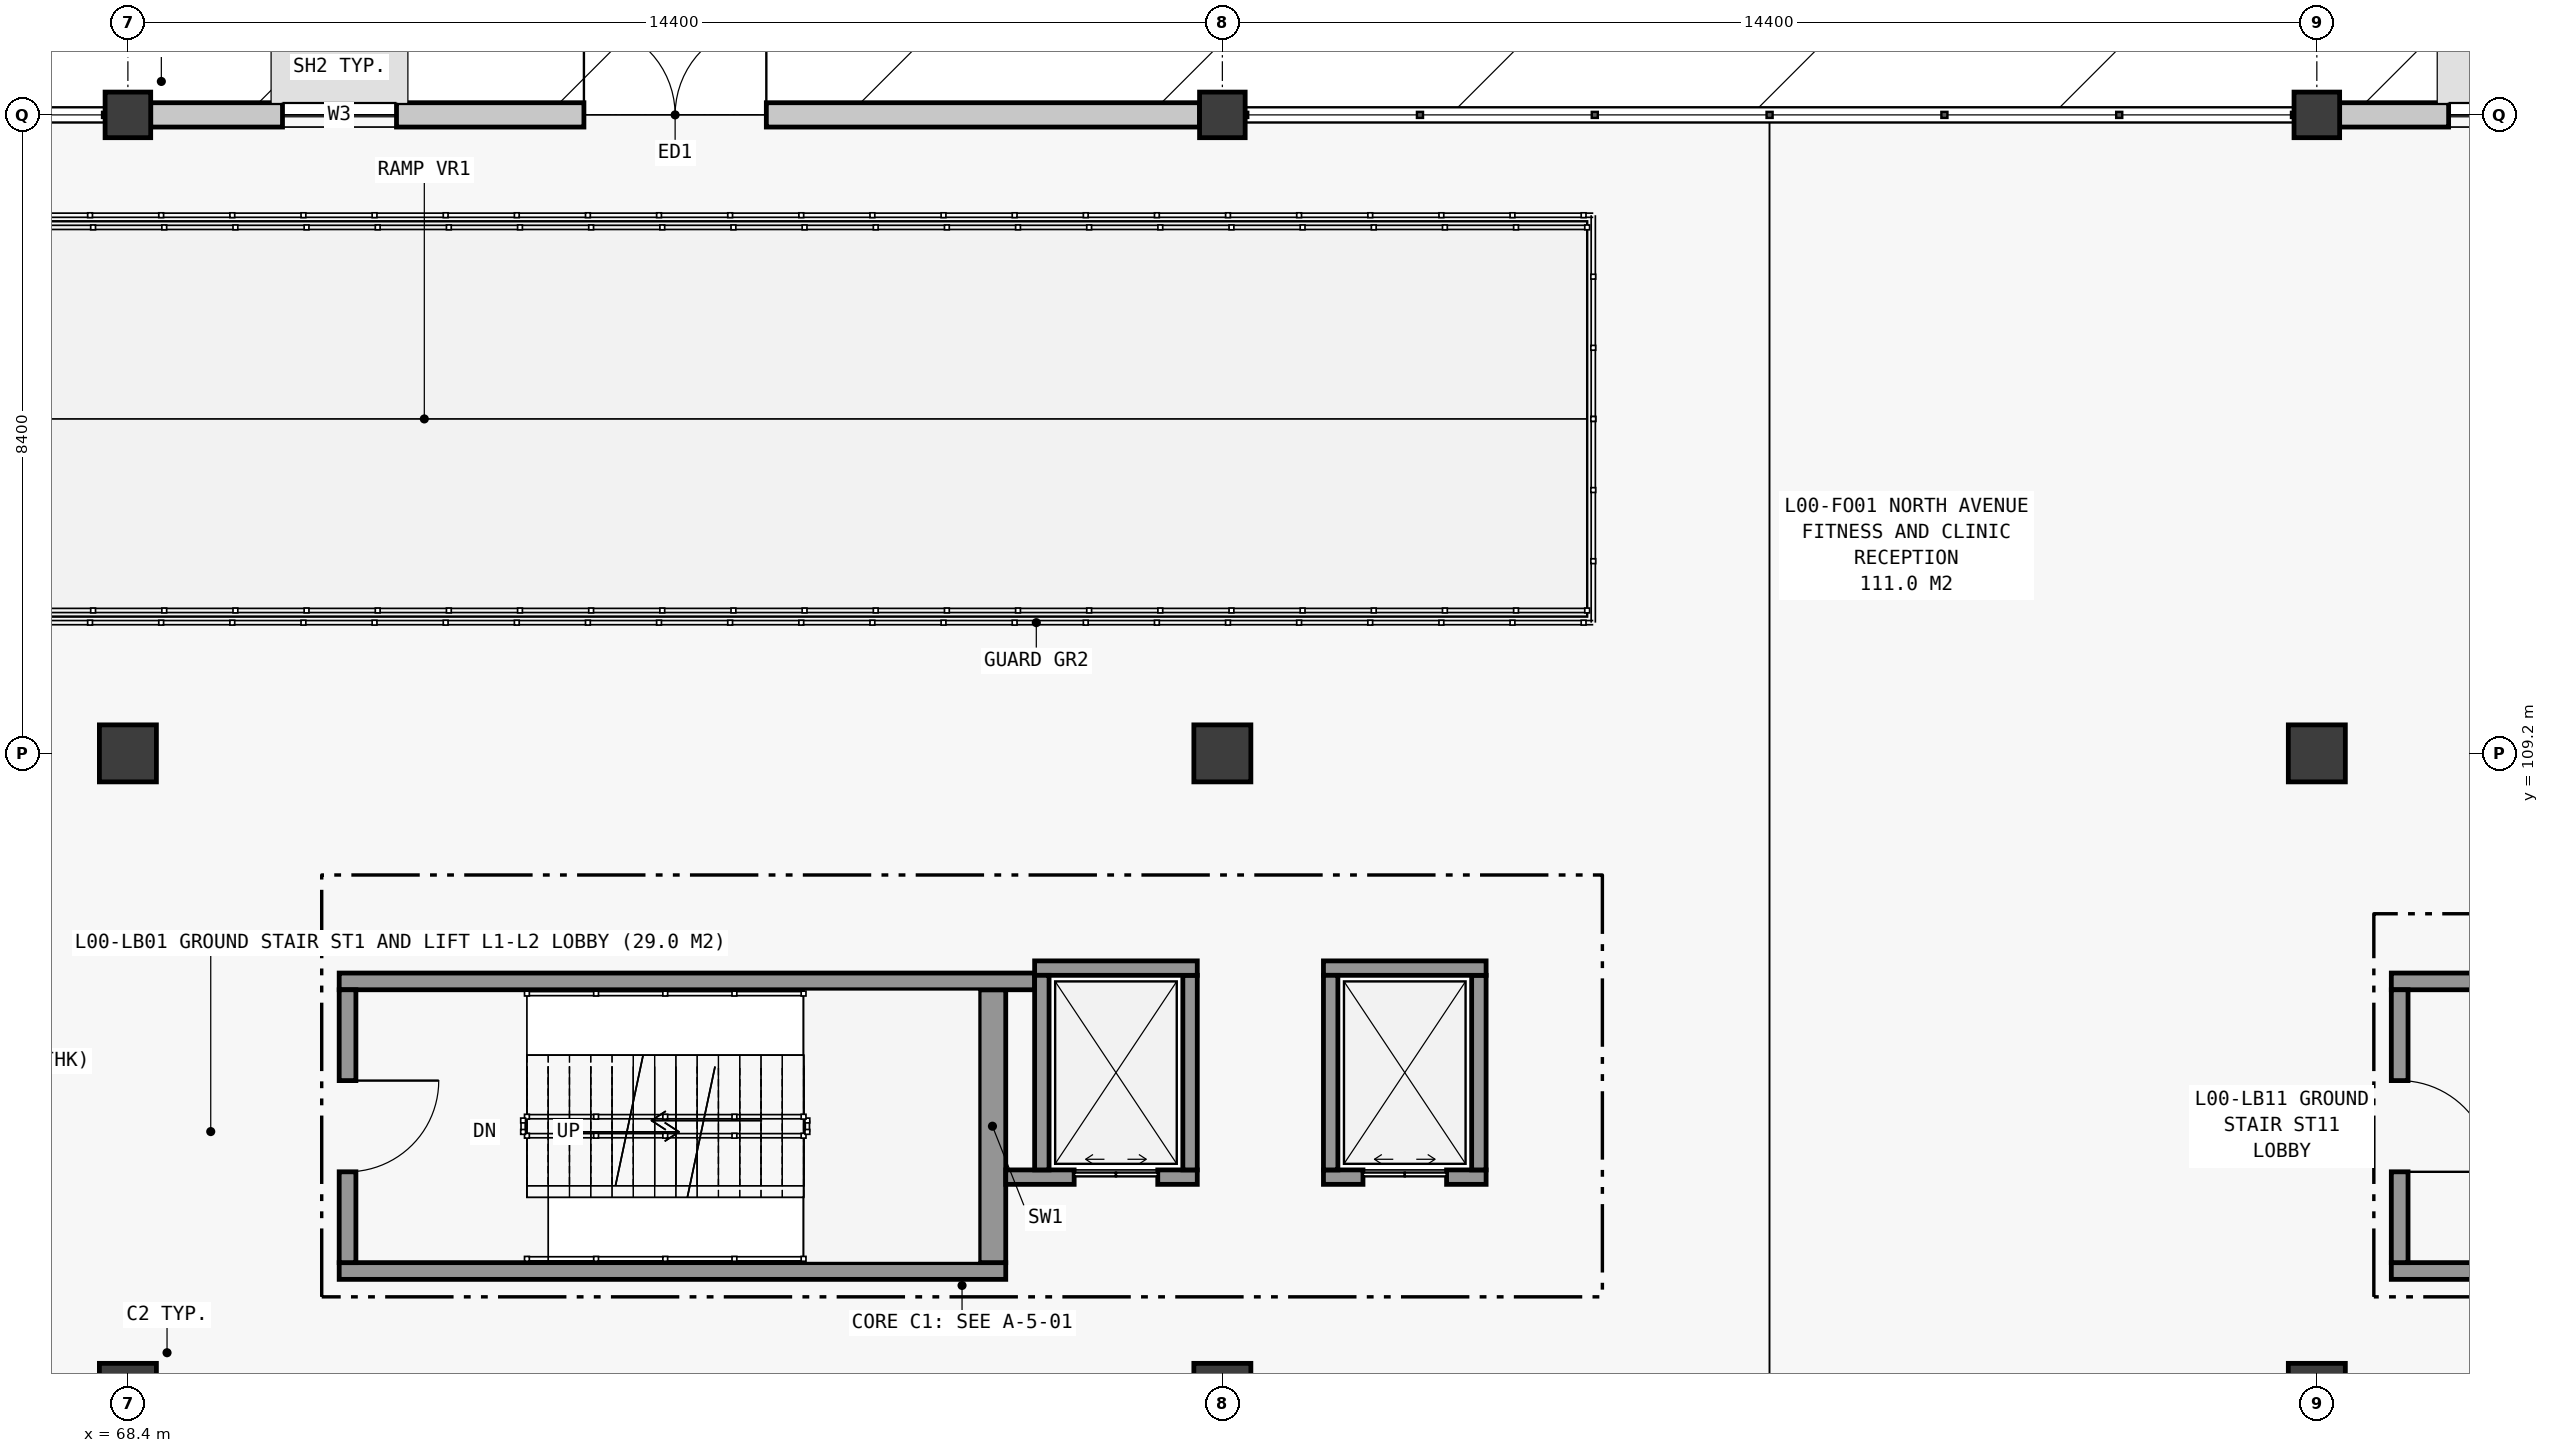
"""IFC4 building model, lengths in metres.
Left out: names, types, materials, properties, quantities, classifications, styles, units other than length and angle.
Written with IfcOpenShell. Run it as: python <this file> out.ifc"""

import sys

from ifc_helpers import new_model, si_unit, direction, frame, frame_2d, origin, origin_2d, place, context, subcontext, project, spatial, rectangle, extrude, element, fill, save


model = new_model("IFC4")
c1 = context("Model", 3, precision=1e-05, world=origin(), true_north=direction((0.0, 1.0)))
c2 = subcontext(c1, "Body", "Model", "MODEL_VIEW")
j1 = project(units=[si_unit("LENGTHUNIT", "METRE"), si_unit("PLANEANGLEUNIT", "RADIAN")], contexts=[c1])
p1 = place(None, origin())
s1 = spatial("IfcSite", under=j1, at=p1, CompositionType="ELEMENT")
p2 = place(p1, origin())
s2 = spatial("IfcBuilding", under=s1, at=p2, CompositionType="ELEMENT")
p3 = place(p2, origin())
s3 = spatial("IfcBuildingStorey", under=s2, at=p3, CompositionType="ELEMENT", Elevation=0.0)
for number, where, z_axis, x_axis in (
    (1, (68.4, 100.8, 0.0), (0.0, 0.0, 1.0), (1.0, 0.0, 0.0)),
    (2, (68.4, 109.2, 0.0), (0.0, 0.0, 1.0), (1.0, 0.0, 0.0)),
):
    element("IfcColumn", number, at=place(p3, frame(where, z_axis=z_axis, x_axis=x_axis)), inside=s3, PredefinedType="COLUMN", context=c2, shape_type="SweptSolid", body=[
        extrude(rectangle(XDim=0.75, YDim=0.75, at=origin_2d()), origin(), (0.0, 0.0, 1.0), 4.8),
    ])
p4 = place(p3, frame((68.4, 117.6, 0.0), z_axis=(0.0, 0.0, 1.0), x_axis=(1.0, 0.0, 0.0)))
e3 = element("IfcColumn", 3, at=p4, inside=s3, PredefinedType="COLUMN", context=c2, shape_type="SweptSolid", body=[
    extrude(rectangle(XDim=0.6, YDim=0.6, at=origin_2d()), origin(), (0.0, 0.0, 1.0), 4.8),
])
for number, where, z_axis, x_axis in (
    (4, (82.8, 100.8, 0.0), (0.0, 0.0, 1.0), (1.0, 0.0, 0.0)),
    (5, (82.8, 109.2, 0.0), (0.0, 0.0, 1.0), (1.0, 0.0, 0.0)),
):
    element("IfcColumn", number, at=place(p3, frame(where, z_axis=z_axis, x_axis=x_axis)), inside=s3, PredefinedType="COLUMN", context=c2, shape_type="SweptSolid", body=[
        extrude(rectangle(XDim=0.75, YDim=0.75, at=origin_2d()), origin(), (0.0, 0.0, 1.0), 4.8),
    ])
p5 = place(p3, frame((82.8, 117.6, 0.0), z_axis=(0.0, 0.0, 1.0), x_axis=(1.0, 0.0, 0.0)))
e6 = element("IfcColumn", 6, at=p5, inside=s3, PredefinedType="COLUMN", context=c2, shape_type="SweptSolid", body=[
    extrude(rectangle(XDim=0.6, YDim=0.6, at=origin_2d()), origin(), (0.0, 0.0, 1.0), 4.8),
])
for number, where, z_axis, x_axis in (
    (7, (97.2, 100.8, 0.0), (0.0, 0.0, 1.0), (1.0, 0.0, 0.0)),
    (8, (97.2, 109.2, 0.0), (0.0, 0.0, 1.0), (1.0, 0.0, 0.0)),
):
    element("IfcColumn", number, at=place(p3, frame(where, z_axis=z_axis, x_axis=x_axis)), inside=s3, PredefinedType="COLUMN", context=c2, shape_type="SweptSolid", body=[
        extrude(rectangle(XDim=0.75, YDim=0.75, at=origin_2d()), origin(), (0.0, 0.0, 1.0), 4.8),
    ])
p6 = place(p3, frame((97.2, 117.6, 0.0), z_axis=(0.0, 0.0, 1.0), x_axis=(1.0, 0.0, 0.0)))
e9 = element("IfcColumn", 9, at=p6, inside=s3, PredefinedType="COLUMN", context=c2, shape_type="SweptSolid", body=[
    extrude(rectangle(XDim=0.6, YDim=0.6, at=origin_2d()), origin(), (0.0, 0.0, 1.0), 4.8),
])
p7 = place(p3, frame((82.5, 117.6, 0.0), z_axis=(0.0, 0.0, 1.0), x_axis=(-1.0, 0.0, 0.0)))
e10 = element("IfcWall", 10, at=p7, inside=s3, PredefinedType="STANDARD", context=c2, shape_type="SweptSolid", body=[
    extrude(rectangle(XDim=13.8, YDim=0.32, at=frame_2d((6.9, 0.0))), origin(), (0.0, 0.0, 1.0), 3.754),
])
p8 = place(p7, frame((5.7, 0.0, 0.0)))
e11 = element("IfcOpeningElement", 11, at=p8, cuts=e10, PredefinedType="OPENING", context=c2, shape_type="SweptSolid", body=[
    extrude(rectangle(XDim=2.4, YDim=2.4, at=frame_2d((1.2, 1.2))), frame((0.0, 0.175, 0.0), z_axis=(0.0, -1.0, 0.0), x_axis=(1.0, 0.0, 0.0)), (0.0, 0.0, 1.0), 0.35),
])
p9 = place(p7, frame((10.566, 0.0, 1.05)))
e12 = element("IfcOpeningElement", 12, at=p9, cuts=e10, PredefinedType="OPENING", context=c2, shape_type="SweptSolid", body=[
    extrude(rectangle(XDim=1.5, YDim=1.5, at=frame_2d((0.75, 0.75))), frame((0.0, 0.175, 0.0), z_axis=(0.0, -1.0, 0.0), x_axis=(1.0, 0.0, 0.0)), (0.0, 0.0, 1.0), 0.35),
])
p10 = place(p3, frame((111.3, 117.6, 0.0), z_axis=(0.0, 0.0, 1.0), x_axis=(-1.0, 0.0, 0.0)))
e13 = element("IfcWall", 13, at=p10, inside=s3, PredefinedType="STANDARD", context=c2, shape_type="SweptSolid", body=[
    extrude(rectangle(XDim=13.8, YDim=0.32, at=frame_2d((6.9, 0.0))), origin(), (0.0, 0.0, 1.0), 3.754),
])
p11 = place(p10, frame((5.7, 0.0, 0.0)))
e14 = element("IfcOpeningElement", 14, at=p11, cuts=e13, PredefinedType="OPENING", context=c2, shape_type="SweptSolid", body=[
    extrude(rectangle(XDim=2.4, YDim=2.4, at=frame_2d((1.2, 1.2))), frame((0.0, 0.175, 0.0), z_axis=(0.0, -1.0, 0.0), x_axis=(1.0, 0.0, 0.0)), (0.0, 0.0, 1.0), 0.35),
])
p12 = place(p10, frame((10.266, 0.0, 1.0)))
e15 = element("IfcOpeningElement", 15, at=p12, cuts=e13, PredefinedType="OPENING", context=c2, shape_type="SweptSolid", body=[
    extrude(rectangle(XDim=2.1, YDim=1.6, at=frame_2d((1.05, 0.8))), frame((0.0, 0.175, 0.0), z_axis=(0.0, -1.0, 0.0), x_axis=(1.0, 0.0, 0.0)), (0.0, 0.0, 1.0), 0.35),
])
p13 = place(p3, frame((71.18, 102.39, 0.0), z_axis=(0.0, 0.0, 1.0), x_axis=(1.0, 0.0, 0.0)))
e16 = element("IfcWall", 16, at=p13, inside=s3, PredefinedType="SOLIDWALL", context=c2, shape_type="SweptSolid", body=[
    extrude(rectangle(XDim=8.77, YDim=0.22, at=frame_2d((4.385, 0.0))), origin(), (0.0, 0.0, 1.0), 4.52),
])
p14 = place(p3, frame((79.775, 102.5, 0.0), z_axis=(0.0, 0.0, 1.0), x_axis=(0.0, 1.0, 0.0)))
e17 = element("IfcWall", 17, at=p14, inside=s3, PredefinedType="SHEAR", context=c2, shape_type="SweptSolid", body=[
    extrude(rectangle(XDim=3.59, YDim=0.35, at=frame_2d((1.795, 0.0))), origin(), (0.0, 0.0, 1.0), 4.52),
])
p15 = place(p3, frame((80.33, 106.2, 0.0), z_axis=(0.0, 0.0, 1.0), x_axis=(-1.0, 0.0, 0.0)))
e18 = element("IfcWall", 18, at=p15, inside=s3, PredefinedType="SOLIDWALL", context=c2, shape_type="SweptSolid", body=[
    extrude(rectangle(XDim=9.15, YDim=0.22, at=frame_2d((4.575, 0.0))), origin(), (0.0, 0.0, 1.0), 4.52),
])
p16 = place(p3, frame((71.29, 106.09, 0.0), z_axis=(0.0, 0.0, 1.0), x_axis=(0.0, -1.0, 0.0)))
e19 = element("IfcWall", 19, at=p16, inside=s3, PredefinedType="SOLIDWALL", context=c2, shape_type="SweptSolid", body=[
    extrude(rectangle(XDim=3.59, YDim=0.22, at=frame_2d((1.795, 0.0))), origin(), (0.0, 0.0, 1.0), 4.52),
])
p17 = place(p16, frame((1.195, 0.0, 0.0)))
e20 = element("IfcOpeningElement", 20, at=p17, cuts=e19, PredefinedType="OPENING", context=c2, shape_type="SweptSolid", body=[
    extrude(rectangle(XDim=1.2, YDim=2.2, at=frame_2d((0.6, 1.1))), frame((0.0, 0.125, 0.0), z_axis=(0.0, -1.0, 0.0), x_axis=(1.0, 0.0, 0.0)), (0.0, 0.0, 1.0), 0.25),
])
for number, where, z_axis, x_axis in (
    (21, (98.18, 102.39, 0.0), (0.0, 0.0, 1.0), (1.0, 0.0, 0.0)),
    (22, (106.95, 106.2, 0.0), (0.0, 0.0, 1.0), (-1.0, 0.0, 0.0)),
):
    element("IfcWall", number, at=place(p3, frame(where, z_axis=z_axis, x_axis=x_axis)), inside=s3, PredefinedType="SOLIDWALL", context=c2, shape_type="SweptSolid", body=[
        extrude(rectangle(XDim=8.77, YDim=0.22, at=frame_2d((4.385, 0.0))), origin(), (0.0, 0.0, 1.0), 4.52),
    ])
p18 = place(p3, frame((98.29, 106.09, 0.0), z_axis=(0.0, 0.0, 1.0), x_axis=(0.0, -1.0, 0.0)))
e23 = element("IfcWall", 23, at=p18, inside=s3, PredefinedType="SOLIDWALL", context=c2, shape_type="SweptSolid", body=[
    extrude(rectangle(XDim=3.59, YDim=0.22, at=frame_2d((1.795, 0.0))), origin(), (0.0, 0.0, 1.0), 4.52),
])
p19 = place(p18, frame((1.195, 0.0, 0.0)))
e24 = element("IfcOpeningElement", 24, at=p19, cuts=e23, PredefinedType="OPENING", context=c2, shape_type="SweptSolid", body=[
    extrude(rectangle(XDim=1.2, YDim=2.2, at=frame_2d((0.6, 1.1))), frame((0.0, 0.125, 0.0), z_axis=(0.0, -1.0, 0.0), x_axis=(1.0, 0.0, 0.0)), (0.0, 0.0, 1.0), 0.25),
])
p20 = place(p3, frame((79.95, 103.625, 0.0), z_axis=(0.0, 0.0, 1.0), x_axis=(1.0, 0.0, 0.0)))
e25 = element("IfcWall", 25, at=p20, inside=s3, PredefinedType="SOLIDWALL", context=c2, shape_type="SweptSolid", body=[
    extrude(rectangle(XDim=2.52, YDim=0.19, at=frame_2d((1.26, 0.0))), origin(), (0.0, 0.0, 1.0), 4.52),
])
p21 = place(p20, frame((0.9, 0.0, 0.0)))
e26 = element("IfcOpeningElement", 26, at=p21, cuts=e25, PredefinedType="OPENING", context=c2, shape_type="SweptSolid", body=[
    extrude(rectangle(XDim=1.1, YDim=2.2, at=frame_2d((0.55, 1.1))), frame((0.0, 0.11, 0.0), z_axis=(0.0, -1.0, 0.0), x_axis=(1.0, 0.0, 0.0)), (0.0, 0.0, 1.0), 0.22),
])
p22 = place(p3, frame((82.375, 103.72, 0.0), z_axis=(0.0, 0.0, 1.0), x_axis=(0.0, 1.0, 0.0)))
e27 = element("IfcWall", 27, at=p22, inside=s3, PredefinedType="SOLIDWALL", context=c2, shape_type="SweptSolid", body=[
    extrude(rectangle(XDim=2.56, YDim=0.19, at=frame_2d((1.28, 0.0))), origin(), (0.0, 0.0, 1.0), 4.52),
])
p23 = place(p3, frame((82.47, 106.375, 0.0), z_axis=(0.0, 0.0, 1.0), x_axis=(-1.0, 0.0, 0.0)))
e28 = element("IfcWall", 28, at=p23, inside=s3, PredefinedType="SOLIDWALL", context=c2, shape_type="SweptSolid", body=[
    extrude(rectangle(XDim=2.14, YDim=0.19, at=frame_2d((1.07, 0.0))), origin(), (0.0, 0.0, 1.0), 4.52),
])
p24 = place(p3, frame((80.425, 106.28, 0.0), z_axis=(0.0, 0.0, 1.0), x_axis=(0.0, -1.0, 0.0)))
e29 = element("IfcWall", 29, at=p24, inside=s3, PredefinedType="SOLIDWALL", context=c2, shape_type="SweptSolid", body=[
    extrude(rectangle(XDim=2.56, YDim=0.19, at=frame_2d((1.28, 0.0))), origin(), (0.0, 0.0, 1.0), 4.52),
])
p25 = place(p3, frame((84.13, 103.625, 0.0), z_axis=(0.0, 0.0, 1.0), x_axis=(1.0, 0.0, 0.0)))
e30 = element("IfcWall", 30, at=p25, inside=s3, PredefinedType="SOLIDWALL", context=c2, shape_type="SweptSolid", body=[
    extrude(rectangle(XDim=2.14, YDim=0.19, at=frame_2d((1.07, 0.0))), origin(), (0.0, 0.0, 1.0), 4.52),
])
p26 = place(p25, frame((0.52, 0.0, 0.0)))
e31 = element("IfcOpeningElement", 31, at=p26, cuts=e30, PredefinedType="OPENING", context=c2, shape_type="SweptSolid", body=[
    extrude(rectangle(XDim=1.1, YDim=2.2, at=frame_2d((0.55, 1.1))), frame((0.0, 0.11, 0.0), z_axis=(0.0, -1.0, 0.0), x_axis=(1.0, 0.0, 0.0)), (0.0, 0.0, 1.0), 0.22),
])
p27 = place(p3, frame((86.175, 103.72, 0.0), z_axis=(0.0, 0.0, 1.0), x_axis=(0.0, 1.0, 0.0)))
e32 = element("IfcWall", 32, at=p27, inside=s3, PredefinedType="SOLIDWALL", context=c2, shape_type="SweptSolid", body=[
    extrude(rectangle(XDim=2.56, YDim=0.19, at=frame_2d((1.28, 0.0))), origin(), (0.0, 0.0, 1.0), 4.52),
])
p28 = place(p3, frame((86.27, 106.375, 0.0), z_axis=(0.0, 0.0, 1.0), x_axis=(-1.0, 0.0, 0.0)))
e33 = element("IfcWall", 33, at=p28, inside=s3, PredefinedType="SOLIDWALL", context=c2, shape_type="SweptSolid", body=[
    extrude(rectangle(XDim=2.14, YDim=0.19, at=frame_2d((1.07, 0.0))), origin(), (0.0, 0.0, 1.0), 4.52),
])
p29 = place(p3, frame((84.225, 106.28, 0.0), z_axis=(0.0, 0.0, 1.0), x_axis=(0.0, -1.0, 0.0)))
e34 = element("IfcWall", 34, at=p29, inside=s3, PredefinedType="SOLIDWALL", context=c2, shape_type="SweptSolid", body=[
    extrude(rectangle(XDim=2.56, YDim=0.19, at=frame_2d((1.28, 0.0))), origin(), (0.0, 0.0, 1.0), 4.52),
])
p30 = place(p8, frame((2.4, 0.0, 0.0), z_axis=(0.0, 0.0, 1.0), x_axis=(-1.0, 0.0, 0.0)))
e35 = element("IfcDoor", 35, at=p30, inside=s3, OperationType="DOUBLE_DOOR_SINGLE_SWING", PredefinedType="DOOR", context=c2, shape_type="SweptSolid", body=[
    extrude(rectangle(XDim=2.4, YDim=2.4, at=frame_2d((1.2, 1.2))), frame((0.0, 0.025, 0.0), z_axis=(0.0, -1.0, 0.0), x_axis=(1.0, 0.0, 0.0)), (0.0, 0.0, 1.0), 0.05),
])
fill(e11, e35)
p31 = place(p9, origin())
e36 = element("IfcWindow", 36, at=p31, inside=s3, PartitioningType="SINGLE_PANEL", PredefinedType="WINDOW", context=c2, shape_type="SweptSolid", body=[
    extrude(rectangle(XDim=1.5, YDim=1.5, at=frame_2d((0.75, 0.75))), frame((0.0, 0.03, 0.0), z_axis=(0.0, -1.0, 0.0), x_axis=(1.0, 0.0, 0.0)), (0.0, 0.0, 1.0), 0.06),
])
fill(e12, e36)
p32 = place(p12, origin())
e37 = element("IfcWindow", 37, at=p32, inside=s3, PartitioningType="SINGLE_PANEL", PredefinedType="WINDOW", context=c2, shape_type="SweptSolid", body=[
    extrude(rectangle(XDim=2.1, YDim=1.6, at=frame_2d((1.05, 0.8))), frame((0.0, 0.03, 0.0), z_axis=(0.0, -1.0, 0.0), x_axis=(1.0, 0.0, 0.0)), (0.0, 0.0, 1.0), 0.06),
])
fill(e15, e37)
p33 = place(p17, origin())
e38 = element("IfcDoor", 38, at=p33, inside=s3, OperationType="SINGLE_SWING_LEFT", PredefinedType="DOOR", context=c2, shape_type="SweptSolid", body=[
    extrude(rectangle(XDim=1.2, YDim=2.2, at=frame_2d((0.6, 1.1))), frame((0.0, 0.025, 0.0), z_axis=(0.0, -1.0, 0.0), x_axis=(1.0, 0.0, 0.0)), (0.0, 0.0, 1.0), 0.05),
])
fill(e20, e38)
p34 = place(p19, origin())
e39 = element("IfcDoor", 39, at=p34, inside=s3, OperationType="SINGLE_SWING_RIGHT", PredefinedType="DOOR", context=c2, shape_type="SweptSolid", body=[
    extrude(rectangle(XDim=1.2, YDim=2.2, at=frame_2d((0.6, 1.1))), frame((0.0, 0.025, 0.0), z_axis=(0.0, -1.0, 0.0), x_axis=(1.0, 0.0, 0.0)), (0.0, 0.0, 1.0), 0.05),
])
fill(e24, e39)
p35 = place(p21, origin())
e40 = element("IfcDoor", 40, at=p35, inside=s3, OperationType="DOUBLE_DOOR_SLIDING", PredefinedType="DOOR", context=c2, shape_type="SweptSolid", body=[
    extrude(rectangle(XDim=1.1, YDim=2.2, at=frame_2d((0.55, 1.1))), frame((0.0, 0.025, 0.0), z_axis=(0.0, -1.0, 0.0), x_axis=(1.0, 0.0, 0.0)), (0.0, 0.0, 1.0), 0.05),
])
fill(e26, e40)
p36 = place(p26, origin())
e41 = element("IfcDoor", 41, at=p36, inside=s3, OperationType="DOUBLE_DOOR_SLIDING", PredefinedType="DOOR", context=c2, shape_type="SweptSolid", body=[
    extrude(rectangle(XDim=1.1, YDim=2.2, at=frame_2d((0.55, 1.1))), frame((0.0, 0.025, 0.0), z_axis=(0.0, -1.0, 0.0), x_axis=(1.0, 0.0, 0.0)), (0.0, 0.0, 1.0), 0.05),
])
fill(e31, e41)
save(model, sys.argv[1])
